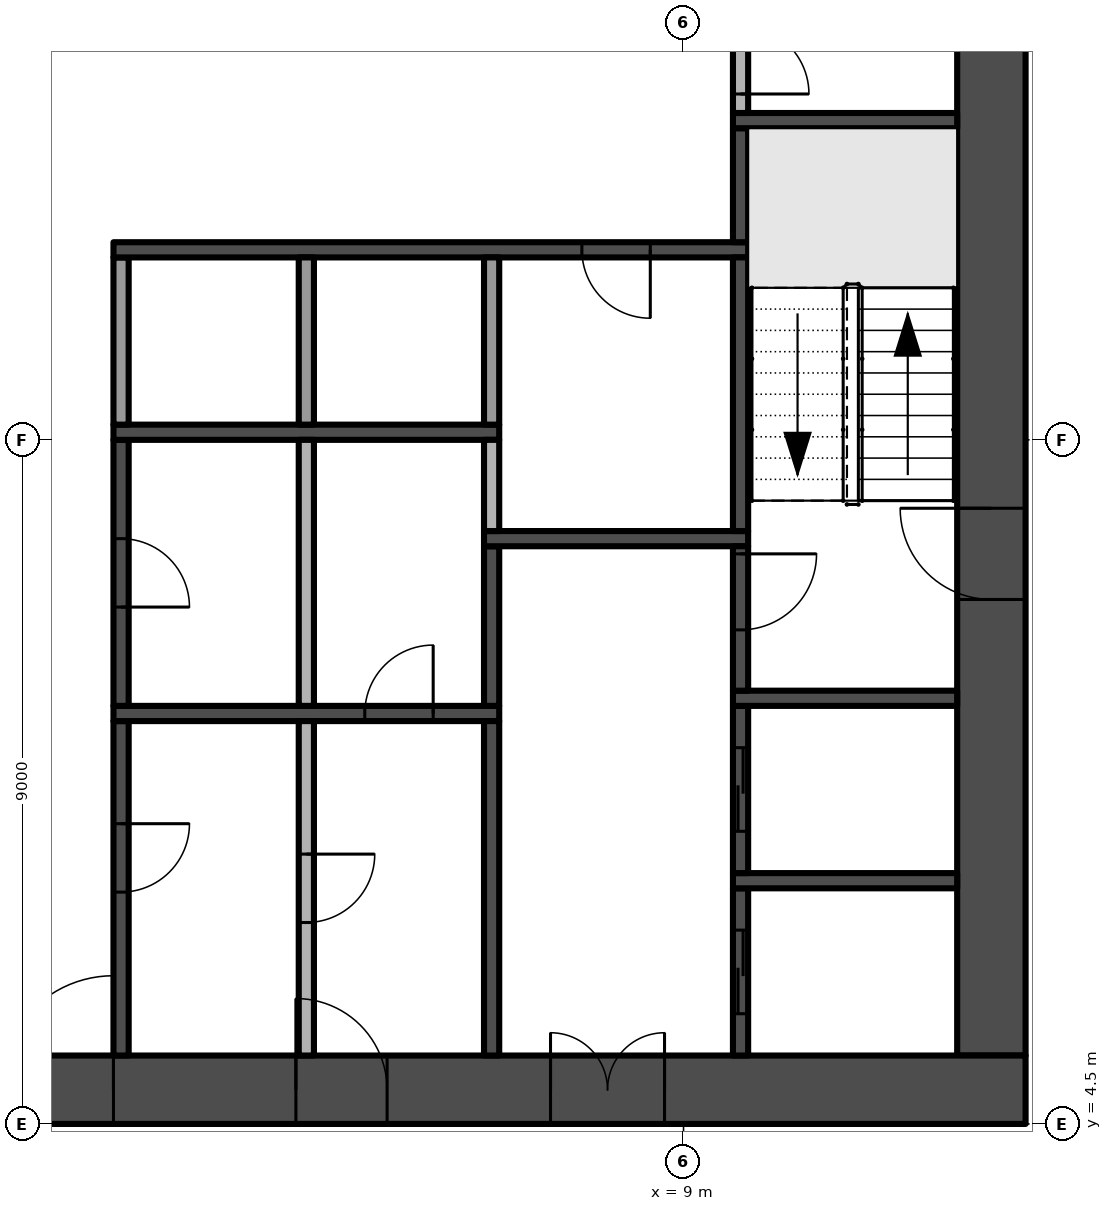
"""IFC4 building model, lengths in metres.
Left out: names, types, materials, properties, quantities, classifications, styles, units other than length and angle.
Written with IfcOpenShell. Run it as: python <this file> out.ifc"""

import sys

from ifc_helpers import new_model, si_unit, direction, frame, frame_2d, origin, place, context, subcontext, project, spatial, rectangle, extrude, element, fill, save


model = new_model("IFC4")
c1 = context("Model", 3, precision=1e-05, world=origin(), true_north=direction((0.0, 1.0)))
c2 = subcontext(c1, "Body", "Model", "MODEL_VIEW")
j1 = project(units=[si_unit("LENGTHUNIT", "METRE"), si_unit("PLANEANGLEUNIT", "RADIAN")], contexts=[c1])
p1 = place(None, origin())
s1 = spatial("IfcSite", under=j1, at=p1, CompositionType="ELEMENT")
p2 = place(p1, origin())
s2 = spatial("IfcBuilding", under=s1, at=p2, CompositionType="ELEMENT")
p3 = place(p2, frame((0.0, 0.0, 41.6)))
s3 = spatial("IfcBuildingStorey", under=s2, at=p3, CompositionType="ELEMENT", Elevation=41.6)
p4 = place(p3, frame((-13.5, 4.95, -0.3), z_axis=(0.0, 0.0, 1.0), x_axis=(1.0, 0.0, 0.0)))
e1 = element("IfcWall", 1, at=p4, inside=s3, PredefinedType="SHEAR", context=c2, shape_type="SweptSolid", body=[
    extrude(rectangle(XDim=27.0, YDim=0.9, at=frame_2d((13.5, 0.0))), origin(), (0.0, 0.0, 1.0), 3.8),
])
p5 = place(p4, frame((12.0, 0.0, 0.3)))
e2 = element("IfcOpeningElement", 2, at=p5, cuts=e1, PredefinedType="OPENING", context=c2, shape_type="SweptSolid", body=[
    extrude(rectangle(XDim=3.0, YDim=2.4, at=frame_2d((1.5, 1.2))), frame((0.0, 0.46, 0.0), z_axis=(0.0, -1.0, 0.0), x_axis=(1.0, 0.0, 0.0)), (0.0, 0.0, 1.0), 0.92),
])
p6 = place(p4, frame((4.9, 0.0, 0.3)))
e3 = element("IfcOpeningElement", 3, at=p6, cuts=e1, PredefinedType="OPENING", context=c2, shape_type="SweptSolid", body=[
    extrude(rectangle(XDim=1.2, YDim=2.2, at=frame_2d((0.6, 1.1))), frame((0.0, 0.46, 0.0), z_axis=(0.0, -1.0, 0.0), x_axis=(1.0, 0.0, 0.0)), (0.0, 0.0, 1.0), 0.92),
])
p7 = place(p4, frame((20.75, 0.0, 0.3)))
e4 = element("IfcOpeningElement", 4, at=p7, cuts=e1, PredefinedType="OPENING", context=c2, shape_type="SweptSolid", body=[
    extrude(rectangle(XDim=1.5, YDim=2.2, at=frame_2d((0.75, 1.1))), frame((0.0, 0.46, 0.0), z_axis=(0.0, -1.0, 0.0), x_axis=(1.0, 0.0, 0.0)), (0.0, 0.0, 1.0), 0.92),
])
p8 = place(p4, frame((17.4, 0.0, 0.3)))
e5 = element("IfcOpeningElement", 5, at=p8, cuts=e1, PredefinedType="OPENING", context=c2, shape_type="SweptSolid", body=[
    extrude(rectangle(XDim=1.2, YDim=2.2, at=frame_2d((0.6, 1.1))), frame((0.0, 0.46, 0.0), z_axis=(0.0, -1.0, 0.0), x_axis=(1.0, 0.0, 0.0)), (0.0, 0.0, 1.0), 0.92),
])
p9 = place(p3, frame((13.05, 5.4, -0.3), z_axis=(0.0, 0.0, 1.0), x_axis=(0.0, 1.0, 0.0)))
e6 = element("IfcWall", 6, at=p9, inside=s3, PredefinedType="SHEAR", context=c2, shape_type="SweptSolid", body=[
    extrude(rectangle(XDim=16.2, YDim=0.9, at=frame_2d((8.1, 0.0))), origin(), (0.0, 0.0, 1.0), 3.8),
])
p10 = place(p9, frame((6.0, 0.0, 0.3)))
e7 = element("IfcOpeningElement", 7, at=p10, cuts=e6, PredefinedType="OPENING", context=c2, shape_type="SweptSolid", body=[
    extrude(rectangle(XDim=1.2, YDim=2.2, at=frame_2d((0.6, 1.1))), frame((0.0, 0.46, 0.0), z_axis=(0.0, -1.0, 0.0), x_axis=(1.0, 0.0, 0.0)), (0.0, 0.0, 1.0), 0.92),
])
p11 = place(p3, frame((1.6, 9.8, 0.0), z_axis=(0.0, 0.0, 1.0), x_axis=(0.0, -1.0, 0.0)))
e8 = element("IfcWall", 8, at=p11, inside=s3, PredefinedType="SHEAR", context=c2, shape_type="SweptSolid", body=[
    extrude(rectangle(XDim=4.4, YDim=0.2, at=frame_2d((2.2, 0.0))), origin(), (0.0, 0.0, 1.0), 3.5),
])
p12 = place(p11, frame((1.35, 0.0, 0.0)))
e9 = element("IfcOpeningElement", 9, at=p12, cuts=e8, PredefinedType="OPENING", context=c2, shape_type="SweptSolid", body=[
    extrude(rectangle(XDim=0.9, YDim=2.1, at=frame_2d((0.45, 1.05))), frame((0.0, 0.11, 0.0), z_axis=(0.0, -1.0, 0.0), x_axis=(1.0, 0.0, 0.0)), (0.0, 0.0, 1.0), 0.22),
])
p13 = place(p3, frame((1.5, 9.9, 0.0), z_axis=(0.0, 0.0, 1.0), x_axis=(1.0, 0.0, 0.0)))
e10 = element("IfcWall", 10, at=p13, inside=s3, PredefinedType="SHEAR", context=c2, shape_type="SweptSolid", body=[
    extrude(rectangle(XDim=5.075, YDim=0.2, at=frame_2d((2.538, 0.0))), origin(), (0.0, 0.0, 1.0), 3.5),
])
p14 = place(p13, frame((3.306, 0.0, 0.0)))
e11 = element("IfcOpeningElement", 11, at=p14, cuts=e10, PredefinedType="OPENING", context=c2, shape_type="SweptSolid", body=[
    extrude(rectangle(XDim=0.9, YDim=2.1, at=frame_2d((0.45, 1.05))), frame((0.0, 0.11, 0.0), z_axis=(0.0, -1.0, 0.0), x_axis=(1.0, 0.0, 0.0)), (0.0, 0.0, 1.0), 0.22),
])
p15 = place(p3, frame((1.6, 13.5, 0.0), z_axis=(0.0, 0.0, 1.0), x_axis=(0.0, -1.0, 0.0)))
e12 = element("IfcWall", 12, at=p15, inside=s3, PredefinedType="SHEAR", context=c2, shape_type="SweptSolid", body=[
    extrude(rectangle(XDim=3.5, YDim=0.2, at=frame_2d((1.75, 0.0))), origin(), (0.0, 0.0, 1.0), 3.5),
])
p16 = place(p15, frame((1.3, 0.0, 0.0)))
e13 = element("IfcOpeningElement", 13, at=p16, cuts=e12, PredefinedType="OPENING", context=c2, shape_type="SweptSolid", body=[
    extrude(rectangle(XDim=0.9, YDim=2.1, at=frame_2d((0.45, 1.05))), frame((0.0, 0.11, 0.0), z_axis=(0.0, -1.0, 0.0), x_axis=(1.0, 0.0, 0.0)), (0.0, 0.0, 1.0), 0.22),
])
p17 = place(p3, frame((1.5, 13.6, 0.0), z_axis=(0.0, 0.0, 1.0), x_axis=(1.0, 0.0, 0.0)))
e14 = element("IfcWall", 14, at=p17, inside=s3, PredefinedType="SHEAR", context=c2, shape_type="SweptSolid", body=[
    extrude(rectangle(XDim=5.075, YDim=0.2, at=frame_2d((2.538, 0.0))), origin(), (0.0, 0.0, 1.0), 3.5),
])
p18 = place(p3, frame((1.6, 13.7, 0.0), z_axis=(0.0, 0.0, 1.0), x_axis=(0.0, 1.0, 0.0)))
e15 = element("IfcWall", 15, at=p18, inside=s3, PredefinedType="PARTITIONING", context=c2, shape_type="SweptSolid", body=[
    extrude(rectangle(XDim=2.2, YDim=0.2, at=frame_2d((1.1, 0.0))), origin(), (0.0, 0.0, 1.0), 3.5),
])
p19 = place(p3, frame((9.85, 16.0, 0.0), z_axis=(0.0, 0.0, 1.0), x_axis=(-1.0, 0.0, 0.0)))
e16 = element("IfcWall", 16, at=p19, inside=s3, PredefinedType="SHEAR", context=c2, shape_type="SweptSolid", body=[
    extrude(rectangle(XDim=8.35, YDim=0.2, at=frame_2d((4.175, 0.0))), origin(), (0.0, 0.0, 1.0), 3.5),
])
p20 = place(p19, frame((1.288, 0.0, 0.0)))
e17 = element("IfcOpeningElement", 17, at=p20, cuts=e16, PredefinedType="OPENING", context=c2, shape_type="SweptSolid", body=[
    extrude(rectangle(XDim=0.9, YDim=2.1, at=frame_2d((0.45, 1.05))), frame((0.0, 0.11, 0.0), z_axis=(0.0, -1.0, 0.0), x_axis=(1.0, 0.0, 0.0)), (0.0, 0.0, 1.0), 0.22),
])
p21 = place(p3, frame((4.037, 9.8, 0.0), z_axis=(0.0, 0.0, 1.0), x_axis=(0.0, -1.0, 0.0)))
e18 = element("IfcWall", 18, at=p21, inside=s3, PredefinedType="PARTITIONING", context=c2, shape_type="SweptSolid", body=[
    extrude(rectangle(XDim=4.4, YDim=0.2, at=frame_2d((2.2, 0.0))), origin(), (0.0, 0.0, 1.0), 3.5),
])
p22 = place(p21, frame((1.75, 0.0, 0.0)))
e19 = element("IfcOpeningElement", 19, at=p22, cuts=e18, PredefinedType="OPENING", context=c2, shape_type="SweptSolid", body=[
    extrude(rectangle(XDim=0.9, YDim=2.1, at=frame_2d((0.45, 1.05))), frame((0.0, 0.11, 0.0), z_axis=(0.0, -1.0, 0.0), x_axis=(1.0, 0.0, 0.0)), (0.0, 0.0, 1.0), 0.22),
])
p23 = place(p3, frame((4.037, 10.0, 0.0), z_axis=(0.0, 0.0, 1.0), x_axis=(0.0, 1.0, 0.0)))
e20 = element("IfcWall", 20, at=p23, inside=s3, PredefinedType="PARTITIONING", context=c2, shape_type="SweptSolid", body=[
    extrude(rectangle(XDim=3.5, YDim=0.2, at=frame_2d((1.75, 0.0))), origin(), (0.0, 0.0, 1.0), 3.5),
])
p24 = place(p3, frame((4.037, 13.7, 0.0), z_axis=(0.0, 0.0, 1.0), x_axis=(0.0, 1.0, 0.0)))
e21 = element("IfcWall", 21, at=p24, inside=s3, PredefinedType="PARTITIONING", context=c2, shape_type="SweptSolid", body=[
    extrude(rectangle(XDim=2.2, YDim=0.2, at=frame_2d((1.1, 0.0))), origin(), (0.0, 0.0, 1.0), 3.5),
])
p25 = place(p3, frame((6.475, 5.4, 0.0), z_axis=(0.0, 0.0, 1.0), x_axis=(0.0, 1.0, 0.0)))
e22 = element("IfcWall", 22, at=p25, inside=s3, PredefinedType="SHEAR", context=c2, shape_type="SweptSolid", body=[
    extrude(rectangle(XDim=4.4, YDim=0.2, at=frame_2d((2.2, 0.0))), origin(), (0.0, 0.0, 1.0), 3.5),
])
p26 = place(p3, frame((6.475, 10.0, 0.0), z_axis=(0.0, 0.0, 1.0), x_axis=(0.0, 1.0, 0.0)))
e23 = element("IfcWall", 23, at=p26, inside=s3, PredefinedType="SHEAR", context=c2, shape_type="SweptSolid", body=[
    extrude(rectangle(XDim=2.1, YDim=0.2, at=frame_2d((1.05, 0.0))), origin(), (0.0, 0.0, 1.0), 3.5),
])
p27 = place(p3, frame((6.375, 12.2, 0.0), z_axis=(0.0, 0.0, 1.0), x_axis=(1.0, 0.0, 0.0)))
e24 = element("IfcWall", 24, at=p27, inside=s3, PredefinedType="SHEAR", context=c2, shape_type="SweptSolid", body=[
    extrude(rectangle(XDim=3.475, YDim=0.2, at=frame_2d((1.738, 0.0))), origin(), (0.0, 0.0, 1.0), 3.5),
])
p28 = place(p3, frame((6.475, 12.3, 0.0), z_axis=(0.0, 0.0, 1.0), x_axis=(0.0, 1.0, 0.0)))
e25 = element("IfcWall", 25, at=p28, inside=s3, PredefinedType="PARTITIONING", context=c2, shape_type="SweptSolid", body=[
    extrude(rectangle(XDim=1.2, YDim=0.2, at=frame_2d((0.6, 0.0))), origin(), (0.0, 0.0, 1.0), 3.5),
])
p29 = place(p3, frame((6.475, 13.7, 0.0), z_axis=(0.0, 0.0, 1.0), x_axis=(0.0, 1.0, 0.0)))
e26 = element("IfcWall", 26, at=p29, inside=s3, PredefinedType="PARTITIONING", context=c2, shape_type="SweptSolid", body=[
    extrude(rectangle(XDim=2.2, YDim=0.2, at=frame_2d((1.1, 0.0))), origin(), (0.0, 0.0, 1.0), 3.5),
])
p30 = place(p3, frame((9.75, 5.4, 0.0), z_axis=(0.0, 0.0, 1.0), x_axis=(0.0, 1.0, 0.0)))
e27 = element("IfcWall", 27, at=p30, inside=s3, PredefinedType="SHEAR", context=c2, shape_type="SweptSolid", body=[
    extrude(rectangle(XDim=2.2, YDim=0.2, at=frame_2d((1.1, 0.0))), origin(), (0.0, 0.0, 1.0), 3.5),
])
p31 = place(p30, frame((0.55, 0.0, 0.0)))
e28 = element("IfcOpeningElement", 28, at=p31, cuts=e27, PredefinedType="OPENING", context=c2, shape_type="SweptSolid", body=[
    extrude(rectangle(XDim=1.1, YDim=2.1, at=frame_2d((0.55, 1.05))), frame((0.0, 0.11, 0.0), z_axis=(0.0, -1.0, 0.0), x_axis=(1.0, 0.0, 0.0)), (0.0, 0.0, 1.0), 0.22),
])
p32 = place(p3, frame((9.65, 7.7, 0.0), z_axis=(0.0, 0.0, 1.0), x_axis=(1.0, 0.0, 0.0)))
e29 = element("IfcWall", 29, at=p32, inside=s3, PredefinedType="SHEAR", context=c2, shape_type="SweptSolid", body=[
    extrude(rectangle(XDim=2.95, YDim=0.2, at=frame_2d((1.475, 0.0))), origin(), (0.0, 0.0, 1.0), 3.5),
])
p33 = place(p3, frame((9.75, 7.8, 0.0), z_axis=(0.0, 0.0, 1.0), x_axis=(0.0, 1.0, 0.0)))
e30 = element("IfcWall", 30, at=p33, inside=s3, PredefinedType="SHEAR", context=c2, shape_type="SweptSolid", body=[
    extrude(rectangle(XDim=2.2, YDim=0.2, at=frame_2d((1.1, 0.0))), origin(), (0.0, 0.0, 1.0), 3.5),
])
p34 = place(p33, frame((0.55, 0.0, 0.0)))
e31 = element("IfcOpeningElement", 31, at=p34, cuts=e30, PredefinedType="OPENING", context=c2, shape_type="SweptSolid", body=[
    extrude(rectangle(XDim=1.1, YDim=2.1, at=frame_2d((0.55, 1.05))), frame((0.0, 0.11, 0.0), z_axis=(0.0, -1.0, 0.0), x_axis=(1.0, 0.0, 0.0)), (0.0, 0.0, 1.0), 0.22),
])
p35 = place(p3, frame((9.65, 10.1, 0.0), z_axis=(0.0, 0.0, 1.0), x_axis=(1.0, 0.0, 0.0)))
e32 = element("IfcWall", 32, at=p35, inside=s3, PredefinedType="SHEAR", context=c2, shape_type="SweptSolid", body=[
    extrude(rectangle(XDim=2.95, YDim=0.2, at=frame_2d((1.475, 0.0))), origin(), (0.0, 0.0, 1.0), 3.5),
])
p36 = place(p3, frame((9.75, 12.1, 0.0), z_axis=(0.0, 0.0, 1.0), x_axis=(0.0, -1.0, 0.0)))
e33 = element("IfcWall", 33, at=p36, inside=s3, PredefinedType="SHEAR", context=c2, shape_type="SweptSolid", body=[
    extrude(rectangle(XDim=1.9, YDim=0.2, at=frame_2d((0.95, 0.0))), origin(), (0.0, 0.0, 1.0), 3.5),
])
p37 = place(p36, frame((0.1, 0.0, 0.0)))
e34 = element("IfcOpeningElement", 34, at=p37, cuts=e33, PredefinedType="OPENING", context=c2, shape_type="SweptSolid", body=[
    extrude(rectangle(XDim=1.0, YDim=2.2, at=frame_2d((0.5, 1.1))), frame((0.0, 0.11, 0.0), z_axis=(0.0, -1.0, 0.0), x_axis=(1.0, 0.0, 0.0)), (0.0, 0.0, 1.0), 0.22),
])
p38 = place(p3, frame((9.75, 12.3, 0.0), z_axis=(0.0, 0.0, 1.0), x_axis=(0.0, 1.0, 0.0)))
e35 = element("IfcWall", 35, at=p38, inside=s3, PredefinedType="SHEAR", context=c2, shape_type="SweptSolid", body=[
    extrude(rectangle(XDim=3.6, YDim=0.2, at=frame_2d((1.8, 0.0))), origin(), (0.0, 0.0, 1.0), 3.5),
])
p39 = place(p3, frame((9.75, 16.1, 0.0), z_axis=(0.0, 0.0, 1.0), x_axis=(0.0, 1.0, 0.0)))
e36 = element("IfcWall", 36, at=p39, inside=s3, PredefinedType="SHEAR", context=c2, shape_type="SweptSolid", body=[
    extrude(rectangle(XDim=1.5, YDim=0.2, at=frame_2d((0.75, 0.0))), origin(), (0.0, 0.0, 1.0), 3.5),
])
p40 = place(p3, frame((9.65, 17.7, 0.0), z_axis=(0.0, 0.0, 1.0), x_axis=(1.0, 0.0, 0.0)))
e37 = element("IfcWall", 37, at=p40, inside=s3, PredefinedType="SHEAR", context=c2, shape_type="SweptSolid", body=[
    extrude(rectangle(XDim=2.95, YDim=0.2, at=frame_2d((1.475, 0.0))), origin(), (0.0, 0.0, 1.0), 3.5),
])
p41 = place(p3, frame((9.75, 19.2, 0.0), z_axis=(0.0, 0.0, 1.0), x_axis=(0.0, -1.0, 0.0)))
e38 = element("IfcWall", 38, at=p41, inside=s3, PredefinedType="PARTITIONING", context=c2, shape_type="SweptSolid", body=[
    extrude(rectangle(XDim=1.4, YDim=0.2, at=frame_2d((0.7, 0.0))), origin(), (0.0, 0.0, 1.0), 3.5),
])
p42 = place(p41, frame((0.25, 0.0, 0.0)))
e39 = element("IfcOpeningElement", 39, at=p42, cuts=e38, PredefinedType="OPENING", context=c2, shape_type="SweptSolid", body=[
    extrude(rectangle(XDim=0.9, YDim=2.1, at=frame_2d((0.45, 1.05))), frame((0.0, 0.11, 0.0), z_axis=(0.0, -1.0, 0.0), x_axis=(1.0, 0.0, 0.0)), (0.0, 0.0, 1.0), 0.22),
])
p43 = place(p5, frame((3.0, 0.0, 0.0), z_axis=(0.0, 0.0, 1.0), x_axis=(-1.0, 0.0, 0.0)))
e40 = element("IfcDoor", 40, at=p43, inside=s3, OperationType="DOUBLE_DOOR_SINGLE_SWING", PredefinedType="DOOR", context=c2, shape_type="SweptSolid", body=[
    extrude(rectangle(XDim=3.0, YDim=2.4, at=frame_2d((1.5, 1.2))), frame((0.0, 0.025, 0.0), z_axis=(0.0, -1.0, 0.0), x_axis=(1.0, 0.0, 0.0)), (0.0, 0.0, 1.0), 0.05),
])
fill(e2, e40)
p44 = place(p10, frame((1.2, 0.0, 0.0), z_axis=(0.0, 0.0, 1.0), x_axis=(-1.0, 0.0, 0.0)))
e41 = element("IfcDoor", 41, at=p44, inside=s3, OperationType="SINGLE_SWING_LEFT", PredefinedType="DOOR", context=c2, shape_type="SweptSolid", body=[
    extrude(rectangle(XDim=1.2, YDim=2.2, at=frame_2d((0.6, 1.1))), frame((0.0, 0.025, 0.0), z_axis=(0.0, -1.0, 0.0), x_axis=(1.0, 0.0, 0.0)), (0.0, 0.0, 1.0), 0.05),
])
fill(e7, e41)
p45 = place(p7, frame((1.5, 0.0, 0.0), z_axis=(0.0, 0.0, 1.0), x_axis=(-1.0, 0.0, 0.0)))
e42 = element("IfcDoor", 42, at=p45, inside=s3, OperationType="DOUBLE_DOOR_SINGLE_SWING", PredefinedType="DOOR", context=c2, shape_type="SweptSolid", body=[
    extrude(rectangle(XDim=1.5, YDim=2.2, at=frame_2d((0.75, 1.1))), frame((0.0, 0.025, 0.0), z_axis=(0.0, -1.0, 0.0), x_axis=(1.0, 0.0, 0.0)), (0.0, 0.0, 1.0), 0.05),
])
fill(e4, e42)
p46 = place(p8, frame((1.2, 0.0, 0.0), z_axis=(0.0, 0.0, 1.0), x_axis=(-1.0, 0.0, 0.0)))
e43 = element("IfcDoor", 43, at=p46, inside=s3, OperationType="SINGLE_SWING_RIGHT", PredefinedType="DOOR", context=c2, shape_type="SweptSolid", body=[
    extrude(rectangle(XDim=1.2, YDim=2.2, at=frame_2d((0.6, 1.1))), frame((0.0, 0.025, 0.0), z_axis=(0.0, -1.0, 0.0), x_axis=(1.0, 0.0, 0.0)), (0.0, 0.0, 1.0), 0.05),
])
fill(e5, e43)
p47 = place(p37, origin())
e44 = element("IfcDoor", 44, at=p47, inside=s3, OperationType="SINGLE_SWING_LEFT", PredefinedType="DOOR", context=c2, shape_type="SweptSolid", body=[
    extrude(rectangle(XDim=1.0, YDim=2.2, at=frame_2d((0.5, 1.1))), frame((0.0, 0.025, 0.0), z_axis=(0.0, -1.0, 0.0), x_axis=(1.0, 0.0, 0.0)), (0.0, 0.0, 1.0), 0.05),
])
fill(e34, e44)
p48 = place(p31, origin())
e45 = element("IfcDoor", 45, at=p48, inside=s3, OperationType="SLIDING_TO_RIGHT", PredefinedType="DOOR", context=c2, shape_type="SweptSolid", body=[
    extrude(rectangle(XDim=1.1, YDim=2.1, at=frame_2d((0.55, 1.05))), frame((0.0, 0.025, 0.0), z_axis=(0.0, -1.0, 0.0), x_axis=(1.0, 0.0, 0.0)), (0.0, 0.0, 1.0), 0.05),
])
fill(e28, e45)
p49 = place(p34, origin())
e46 = element("IfcDoor", 46, at=p49, inside=s3, OperationType="SLIDING_TO_RIGHT", PredefinedType="DOOR", context=c2, shape_type="SweptSolid", body=[
    extrude(rectangle(XDim=1.1, YDim=2.1, at=frame_2d((0.55, 1.05))), frame((0.0, 0.025, 0.0), z_axis=(0.0, -1.0, 0.0), x_axis=(1.0, 0.0, 0.0)), (0.0, 0.0, 1.0), 0.05),
])
fill(e31, e46)
p50 = place(p12, origin())
e47 = element("IfcDoor", 47, at=p50, inside=s3, OperationType="SINGLE_SWING_LEFT", PredefinedType="DOOR", context=c2, shape_type="SweptSolid", body=[
    extrude(rectangle(XDim=0.9, YDim=2.1, at=frame_2d((0.45, 1.05))), frame((0.0, 0.025, 0.0), z_axis=(0.0, -1.0, 0.0), x_axis=(1.0, 0.0, 0.0)), (0.0, 0.0, 1.0), 0.05),
])
fill(e9, e47)
p51 = place(p22, origin())
e48 = element("IfcDoor", 48, at=p51, inside=s3, OperationType="SINGLE_SWING_LEFT", PredefinedType="DOOR", context=c2, shape_type="SweptSolid", body=[
    extrude(rectangle(XDim=0.9, YDim=2.1, at=frame_2d((0.45, 1.05))), frame((0.0, 0.025, 0.0), z_axis=(0.0, -1.0, 0.0), x_axis=(1.0, 0.0, 0.0)), (0.0, 0.0, 1.0), 0.05),
])
fill(e19, e48)
p52 = place(p16, origin())
e49 = element("IfcDoor", 49, at=p52, inside=s3, OperationType="SINGLE_SWING_RIGHT", PredefinedType="DOOR", context=c2, shape_type="SweptSolid", body=[
    extrude(rectangle(XDim=0.9, YDim=2.1, at=frame_2d((0.45, 1.05))), frame((0.0, 0.025, 0.0), z_axis=(0.0, -1.0, 0.0), x_axis=(1.0, 0.0, 0.0)), (0.0, 0.0, 1.0), 0.05),
])
fill(e13, e49)
p53 = place(p14, origin())
e50 = element("IfcDoor", 50, at=p53, inside=s3, OperationType="SINGLE_SWING_RIGHT", PredefinedType="DOOR", context=c2, shape_type="SweptSolid", body=[
    extrude(rectangle(XDim=0.9, YDim=2.1, at=frame_2d((0.45, 1.05))), frame((0.0, 0.025, 0.0), z_axis=(0.0, -1.0, 0.0), x_axis=(1.0, 0.0, 0.0)), (0.0, 0.0, 1.0), 0.05),
])
fill(e11, e50)
p54 = place(p20, origin())
e51 = element("IfcDoor", 51, at=p54, inside=s3, OperationType="SINGLE_SWING_LEFT", PredefinedType="DOOR", context=c2, shape_type="SweptSolid", body=[
    extrude(rectangle(XDim=0.9, YDim=2.1, at=frame_2d((0.45, 1.05))), frame((0.0, 0.025, 0.0), z_axis=(0.0, -1.0, 0.0), x_axis=(1.0, 0.0, 0.0)), (0.0, 0.0, 1.0), 0.05),
])
fill(e17, e51)
p55 = place(p42, origin())
e52 = element("IfcDoor", 52, at=p55, inside=s3, OperationType="SINGLE_SWING_RIGHT", PredefinedType="DOOR", context=c2, shape_type="SweptSolid", body=[
    extrude(rectangle(XDim=0.9, YDim=2.1, at=frame_2d((0.45, 1.05))), frame((0.0, 0.025, 0.0), z_axis=(0.0, -1.0, 0.0), x_axis=(1.0, 0.0, 0.0)), (0.0, 0.0, 1.0), 0.05),
])
fill(e39, e52)
save(model, sys.argv[1])
